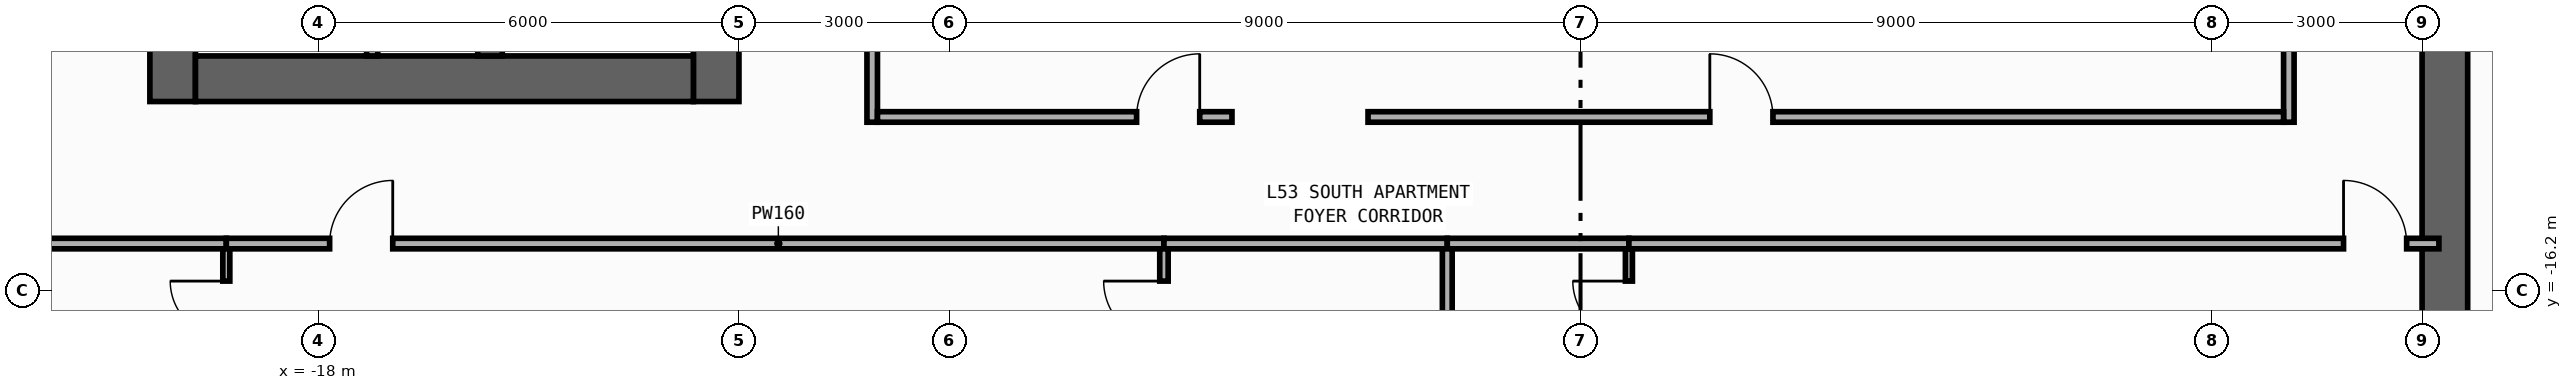
"""IFC4 building model, lengths in metres.
Left out: names, types, materials, properties, quantities, classifications, styles, units other than length and angle.
Written with IfcOpenShell. Run it as: python <this file> out.ifc"""

import sys

from ifc_helpers import new_model, si_unit, direction, frame, frame_2d, origin, place, context, subcontext, project, spatial, rectangle, extrude, element, fill, save


model = new_model("IFC4")
c1 = context("Model", 3, precision=1e-05, world=origin(), true_north=direction((0.0, 1.0)))
c2 = subcontext(c1, "Body", "Model", "MODEL_VIEW")
j1 = project(units=[si_unit("LENGTHUNIT", "METRE"), si_unit("PLANEANGLEUNIT", "RADIAN")], contexts=[c1])
p1 = place(None, origin())
s1 = spatial("IfcSite", under=j1, at=p1, CompositionType="ELEMENT")
p2 = place(p1, origin())
s2 = spatial("IfcBuilding", under=s1, at=p2, CompositionType="ELEMENT")
p3 = place(p2, frame((0.0, 0.0, 229.6)))
s3 = spatial("IfcBuildingStorey", under=s2, at=p3, CompositionType="ELEMENT", Elevation=229.6)
p4 = place(p3, frame((-20.075, -13.5, 0.0), z_axis=(0.0, 0.0, 1.0), x_axis=(0.0, 1.0, 0.0)))
e1 = element("IfcWall", 1, at=p4, inside=s3, PredefinedType="SHEAR", context=c2, shape_type="SweptSolid", body=[
    extrude(rectangle(XDim=27.0, YDim=0.65, at=frame_2d((13.5, 0.0))), origin(), (0.0, 0.0, 1.0), 3.34),
])
p5 = place(p3, frame((-12.325, -13.5, 0.0), z_axis=(0.0, 0.0, 1.0), x_axis=(0.0, 1.0, 0.0)))
e2 = element("IfcWall", 2, at=p5, inside=s3, PredefinedType="SHEAR", context=c2, shape_type="SweptSolid", body=[
    extrude(rectangle(XDim=27.0, YDim=0.65, at=frame_2d((13.5, 0.0))), origin(), (0.0, 0.0, 1.0), 3.34),
])
p6 = place(p5, frame((15.175, 0.0, 0.0)))
e3 = element("IfcOpeningElement", 3, at=p6, cuts=e2, PredefinedType="OPENING", context=c2, shape_type="SweptSolid", body=[
    extrude(rectangle(XDim=0.85, YDim=2.1, at=frame_2d((0.425, 1.05))), frame((0.0, 0.335, 0.0), z_axis=(0.0, -1.0, 0.0), x_axis=(1.0, 0.0, 0.0)), (0.0, 0.0, 1.0), 0.67),
])
p7 = place(p5, frame((21.275, 0.0, 0.0)))
e4 = element("IfcOpeningElement", 4, at=p7, cuts=e2, PredefinedType="OPENING", context=c2, shape_type="SweptSolid", body=[
    extrude(rectangle(XDim=0.85, YDim=2.1, at=frame_2d((0.425, 1.05))), frame((0.0, 0.335, 0.0), z_axis=(0.0, -1.0, 0.0), x_axis=(1.0, 0.0, 0.0)), (0.0, 0.0, 1.0), 0.67),
])
p8 = place(p5, frame((4.275, 0.0, 0.0)))
e5 = element("IfcOpeningElement", 5, at=p8, cuts=e2, PredefinedType="OPENING", context=c2, shape_type="SweptSolid", body=[
    extrude(rectangle(XDim=0.85, YDim=2.1, at=frame_2d((0.425, 1.05))), frame((0.0, 0.335, 0.0), z_axis=(0.0, -1.0, 0.0), x_axis=(1.0, 0.0, 0.0)), (0.0, 0.0, 1.0), 0.67),
])
p9 = place(p5, frame((10.275, 0.0, 0.0)))
e6 = element("IfcOpeningElement", 6, at=p9, cuts=e2, PredefinedType="OPENING", context=c2, shape_type="SweptSolid", body=[
    extrude(rectangle(XDim=0.85, YDim=2.1, at=frame_2d((0.425, 1.05))), frame((0.0, 0.335, 0.0), z_axis=(0.0, -1.0, 0.0), x_axis=(1.0, 0.0, 0.0)), (0.0, 0.0, 1.0), 0.67),
])
p10 = place(p5, frame((12.725, 0.0, 0.0)))
e7 = element("IfcOpeningElement", 7, at=p10, cuts=e2, PredefinedType="OPENING", context=c2, shape_type="SweptSolid", body=[
    extrude(rectangle(XDim=1.15, YDim=2.2, at=frame_2d((0.575, 1.1))), frame((0.0, 0.335, 0.0), z_axis=(0.0, -1.0, 0.0), x_axis=(1.0, 0.0, 0.0)), (0.0, 0.0, 1.0), 0.67),
])
p11 = place(p5, frame((1.625, 0.0, 0.0)))
e8 = element("IfcOpeningElement", 8, at=p11, cuts=e2, PredefinedType="OPENING", context=c2, shape_type="SweptSolid", body=[
    extrude(rectangle(XDim=0.85, YDim=2.1, at=frame_2d((0.425, 1.05))), frame((0.0, 0.335, 0.0), z_axis=(0.0, -1.0, 0.0), x_axis=(1.0, 0.0, 0.0)), (0.0, 0.0, 1.0), 0.67),
])
p12 = place(p3, frame((-19.75, -13.175, 0.0), z_axis=(0.0, 0.0, 1.0), x_axis=(1.0, 0.0, 0.0)))
e9 = element("IfcWall", 9, at=p12, inside=s3, PredefinedType="SHEAR", context=c2, shape_type="SweptSolid", body=[
    extrude(rectangle(XDim=7.1, YDim=0.65, at=frame_2d((3.55, 0.0))), origin(), (0.0, 0.0, 1.0), 3.34),
])
p13 = place(p3, frame((-15.55, -12.85, 0.0), z_axis=(0.0, 0.0, 1.0), x_axis=(0.0, 1.0, 0.0)))
e10 = element("IfcWall", 10, at=p13, inside=s3, PredefinedType="SHEAR", context=c2, shape_type="SweptSolid", body=[
    extrude(rectangle(XDim=25.7, YDim=0.35, at=frame_2d((12.85, 0.0))), origin(), (0.0, 0.0, 1.0), 3.34),
])
p14 = place(p13, frame((12.075, 0.0, 0.0)))
e11 = element("IfcOpeningElement", 11, at=p14, cuts=e10, PredefinedType="OPENING", context=c2, shape_type="SweptSolid", body=[
    extrude(rectangle(XDim=1.15, YDim=2.2, at=frame_2d((0.575, 1.1))), frame((0.0, 0.185, 0.0), z_axis=(0.0, -1.0, 0.0), x_axis=(1.0, 0.0, 0.0)), (0.0, 0.0, 1.0), 0.37),
])
p15 = place(p13, frame((0.975, 0.0, 0.0)))
e12 = element("IfcOpeningElement", 12, at=p15, cuts=e10, PredefinedType="OPENING", context=c2, shape_type="SweptSolid", body=[
    extrude(rectangle(XDim=0.85, YDim=2.1, at=frame_2d((0.425, 1.05))), frame((0.0, 0.185, 0.0), z_axis=(0.0, -1.0, 0.0), x_axis=(1.0, 0.0, 0.0)), (0.0, 0.0, 1.0), 0.37),
])
p16 = place(p3, frame((12.325, -19.8, 0.0), z_axis=(0.0, 0.0, 1.0), x_axis=(0.0, 1.0, 0.0)))
e13 = element("IfcWall", 13, at=p16, inside=s3, PredefinedType="SHEAR", context=c2, shape_type="SweptSolid", body=[
    extrude(rectangle(XDim=27.0, YDim=0.65, at=frame_2d((13.5, 0.0))), origin(), (0.0, 0.0, 1.0), 3.34),
])
p17 = place(p16, frame((23.05, 0.0, 0.0)))
e14 = element("IfcOpeningElement", 14, at=p17, cuts=e13, PredefinedType="OPENING", context=c2, shape_type="SweptSolid", body=[
    extrude(rectangle(XDim=1.1, YDim=2.2, at=frame_2d((0.55, 1.1))), frame((0.0, 0.335, 0.0), z_axis=(0.0, -1.0, 0.0), x_axis=(1.0, 0.0, 0.0)), (0.0, 0.0, 1.0), 0.67),
])
p18 = place(p16, frame((19.85, 0.0, 0.0)))
e15 = element("IfcOpeningElement", 15, at=p18, cuts=e13, PredefinedType="OPENING", context=c2, shape_type="SweptSolid", body=[
    extrude(rectangle(XDim=1.1, YDim=2.2, at=frame_2d((0.55, 1.1))), frame((0.0, 0.335, 0.0), z_axis=(0.0, -1.0, 0.0), x_axis=(1.0, 0.0, 0.0)), (0.0, 0.0, 1.0), 0.67),
])
p19 = place(p16, frame((16.65, 0.0, 0.0)))
e16 = element("IfcOpeningElement", 16, at=p19, cuts=e13, PredefinedType="OPENING", context=c2, shape_type="SweptSolid", body=[
    extrude(rectangle(XDim=1.1, YDim=2.2, at=frame_2d((0.55, 1.1))), frame((0.0, 0.335, 0.0), z_axis=(0.0, -1.0, 0.0), x_axis=(1.0, 0.0, 0.0)), (0.0, 0.0, 1.0), 0.67),
])
p20 = place(p16, frame((10.175, 0.0, 0.0)))
e17 = element("IfcOpeningElement", 17, at=p20, cuts=e13, PredefinedType="OPENING", context=c2, shape_type="SweptSolid", body=[
    extrude(rectangle(XDim=0.85, YDim=2.1, at=frame_2d((0.425, 1.05))), frame((0.0, 0.335, 0.0), z_axis=(0.0, -1.0, 0.0), x_axis=(1.0, 0.0, 0.0)), (0.0, 0.0, 1.0), 0.67),
])
p21 = place(p16, frame((12.725, 0.0, 0.0)))
e18 = element("IfcOpeningElement", 18, at=p21, cuts=e13, PredefinedType="OPENING", context=c2, shape_type="SweptSolid", body=[
    extrude(rectangle(XDim=1.15, YDim=2.2, at=frame_2d((0.575, 1.1))), frame((0.0, 0.335, 0.0), z_axis=(0.0, -1.0, 0.0), x_axis=(1.0, 0.0, 0.0)), (0.0, 0.0, 1.0), 0.67),
])
p22 = place(p16, frame((25.125, 0.0, 0.0)))
e19 = element("IfcOpeningElement", 19, at=p22, cuts=e13, PredefinedType="OPENING", context=c2, shape_type="SweptSolid", body=[
    extrude(rectangle(XDim=0.85, YDim=2.1, at=frame_2d((0.425, 1.05))), frame((0.0, 0.335, 0.0), z_axis=(0.0, -1.0, 0.0), x_axis=(1.0, 0.0, 0.0)), (0.0, 0.0, 1.0), 0.67),
])
p23 = place(p3, frame((-17.23, -12.85, 0.0), z_axis=(0.0, 0.0, 1.0), x_axis=(0.0, 1.0, 0.0)))
e20 = element("IfcWall", 20, at=p23, inside=s3, PredefinedType="PARTITIONING", context=c2, shape_type="SweptSolid", body=[
    extrude(rectangle(XDim=2.38, YDim=0.16, at=frame_2d((1.19, 0.0))), origin(), (0.0, 0.0, 1.0), 3.34),
])
p24 = place(p23, frame((0.46, 0.0, 0.0)))
e21 = element("IfcOpeningElement", 21, at=p24, cuts=e20, PredefinedType="OPENING", context=c2, shape_type="SweptSolid", body=[
    extrude(rectangle(XDim=0.85, YDim=2.1, at=frame_2d((0.425, 1.05))), frame((0.0, 0.09, 0.0), z_axis=(0.0, -1.0, 0.0), x_axis=(1.0, 0.0, 0.0)), (0.0, 0.0, 1.0), 0.18),
])
p25 = place(p3, frame((-10.1, -13.795, 0.0), z_axis=(0.0, 0.0, 1.0), x_axis=(0.0, 1.0, 0.0)))
e22 = element("IfcWall", 22, at=p25, inside=s3, PredefinedType="PARTITIONING", context=c2, shape_type="SweptSolid", body=[
    extrude(rectangle(XDim=9.005, YDim=0.15, at=frame_2d((4.502, 0.0))), origin(), (0.0, 0.0, 1.0), 3.34),
])
p26 = place(p25, frame((7.645, 0.0, 0.0)))
e23 = element("IfcOpeningElement", 23, at=p26, cuts=e22, PredefinedType="OPENING", context=c2, shape_type="SweptSolid", body=[
    extrude(rectangle(XDim=0.9, YDim=2.15, at=frame_2d((0.45, 1.075))), frame((0.0, 0.085, 0.0), z_axis=(0.0, -1.0, 0.0), x_axis=(1.0, 0.0, 0.0)), (0.0, 0.0, 1.0), 0.17),
])
p27 = place(p3, frame((10.1, -13.795, 0.0), z_axis=(0.0, 0.0, 1.0), x_axis=(0.0, 1.0, 0.0)))
e24 = element("IfcWall", 24, at=p27, inside=s3, PredefinedType="PARTITIONING", context=c2, shape_type="SweptSolid", body=[
    extrude(rectangle(XDim=6.375, YDim=0.15, at=frame_2d((3.188, 0.0))), origin(), (0.0, 0.0, 1.0), 3.34),
])
p28 = place(p27, frame((5.015, 0.0, 0.0)))
e25 = element("IfcOpeningElement", 25, at=p28, cuts=e24, PredefinedType="OPENING", context=c2, shape_type="SweptSolid", body=[
    extrude(rectangle(XDim=0.9, YDim=2.15, at=frame_2d((0.45, 1.075))), frame((0.0, 0.085, 0.0), z_axis=(0.0, -1.0, 0.0), x_axis=(1.0, 0.0, 0.0)), (0.0, 0.0, 1.0), 0.17),
])
p29 = place(p3, frame((-21.955, -15.525, 0.0), z_axis=(0.0, 0.0, 1.0), x_axis=(1.0, 0.0, 0.0)))
e26 = element("IfcWall", 26, at=p29, inside=s3, PredefinedType="PARTITIONING", context=c2, shape_type="SweptSolid", body=[
    extrude(rectangle(XDim=2.645, YDim=0.15, at=frame_2d((1.323, 0.0))), origin(), (0.0, 0.0, 1.0), 3.34),
])
p30 = place(p3, frame((-19.31, -15.525, 0.0), z_axis=(0.0, 0.0, 1.0), x_axis=(1.0, 0.0, 0.0)))
e27 = element("IfcWall", 27, at=p30, inside=s3, PredefinedType="PARTITIONING", context=c2, shape_type="SweptSolid", body=[
    extrude(rectangle(XDim=13.37, YDim=0.15, at=frame_2d((6.685, 0.0))), origin(), (0.0, 0.0, 1.0), 3.34),
])
p31 = place(p30, frame((1.473, 0.0, 0.0)))
e28 = element("IfcOpeningElement", 28, at=p31, cuts=e27, PredefinedType="OPENING", context=c2, shape_type="SweptSolid", body=[
    extrude(rectangle(XDim=0.9, YDim=2.15, at=frame_2d((0.45, 1.075))), frame((0.0, 0.085, 0.0), z_axis=(0.0, -1.0, 0.0), x_axis=(1.0, 0.0, 0.0)), (0.0, 0.0, 1.0), 0.17),
])
p32 = place(p3, frame((-5.94, -15.525, 0.0), z_axis=(0.0, 0.0, 1.0), x_axis=(1.0, 0.0, 0.0)))
e29 = element("IfcWall", 29, at=p32, inside=s3, PredefinedType="PARTITIONING", context=c2, shape_type="SweptSolid", body=[
    extrude(rectangle(XDim=4.04, YDim=0.15, at=frame_2d((2.02, 0.0))), origin(), (0.0, 0.0, 1.0), 3.34),
])
p33 = place(p3, frame((-1.9, -15.525, 0.0), z_axis=(0.0, 0.0, 1.0), x_axis=(1.0, 0.0, 0.0)))
e30 = element("IfcWall", 30, at=p33, inside=s3, PredefinedType="PARTITIONING", context=c2, shape_type="SweptSolid", body=[
    extrude(rectangle(XDim=2.59, YDim=0.15, at=frame_2d((1.295, 0.0))), origin(), (0.0, 0.0, 1.0), 3.34),
])
p34 = place(p3, frame((0.69, -15.525, 0.0), z_axis=(0.0, 0.0, 1.0), x_axis=(1.0, 0.0, 0.0)))
e31 = element("IfcWall", 31, at=p34, inside=s3, PredefinedType="PARTITIONING", context=c2, shape_type="SweptSolid", body=[
    extrude(rectangle(XDim=11.55, YDim=0.15, at=frame_2d((5.775, 0.0))), origin(), (0.0, 0.0, 1.0), 3.34),
])
p35 = place(p34, frame((10.19, 0.0, 0.0)))
e32 = element("IfcOpeningElement", 32, at=p35, cuts=e31, PredefinedType="OPENING", context=c2, shape_type="SweptSolid", body=[
    extrude(rectangle(XDim=0.9, YDim=2.15, at=frame_2d((0.45, 1.075))), frame((0.0, 0.085, 0.0), z_axis=(0.0, -1.0, 0.0), x_axis=(1.0, 0.0, 0.0)), (0.0, 0.0, 1.0), 0.17),
])
p36 = place(p3, frame((-10.025, -13.72, 0.0), z_axis=(0.0, 0.0, 1.0), x_axis=(1.0, 0.0, 0.0)))
e33 = element("IfcWall", 33, at=p36, inside=s3, PredefinedType="PARTITIONING", context=c2, shape_type="SweptSolid", body=[
    extrude(rectangle(XDim=5.055, YDim=0.15, at=frame_2d((2.527, 0.0))), origin(), (0.0, 0.0, 1.0), 3.34),
])
p37 = place(p36, frame((3.695, 0.0, 0.0)))
e34 = element("IfcOpeningElement", 34, at=p37, cuts=e33, PredefinedType="OPENING", context=c2, shape_type="SweptSolid", body=[
    extrude(rectangle(XDim=0.9, YDim=2.15, at=frame_2d((0.45, 1.075))), frame((0.0, 0.085, 0.0), z_axis=(0.0, -1.0, 0.0), x_axis=(1.0, 0.0, 0.0)), (0.0, 0.0, 1.0), 0.17),
])
p38 = place(p3, frame((-3.03, -13.72, 0.0), z_axis=(0.0, 0.0, 1.0), x_axis=(1.0, 0.0, 0.0)))
e35 = element("IfcWall", 35, at=p38, inside=s3, PredefinedType="PARTITIONING", context=c2, shape_type="SweptSolid", body=[
    extrude(rectangle(XDim=13.055, YDim=0.15, at=frame_2d((6.527, 0.0))), origin(), (0.0, 0.0, 1.0), 3.34),
])
p39 = place(p38, frame((4.874, 0.0, 0.0)))
e36 = element("IfcOpeningElement", 36, at=p39, cuts=e35, PredefinedType="OPENING", context=c2, shape_type="SweptSolid", body=[
    extrude(rectangle(XDim=0.9, YDim=2.15, at=frame_2d((0.45, 1.075))), frame((0.0, 0.085, 0.0), z_axis=(0.0, -1.0, 0.0), x_axis=(1.0, 0.0, 0.0)), (0.0, 0.0, 1.0), 0.17),
])
p40 = place(p3, frame((-19.31, -18.1, 0.0), z_axis=(0.0, 0.0, 1.0), x_axis=(0.0, 1.0, 0.0)))
e37 = element("IfcWall", 37, at=p40, inside=s3, PredefinedType="PARTITIONING", context=c2, shape_type="SweptSolid", body=[
    extrude(rectangle(XDim=2.5, YDim=0.1, at=frame_2d((1.25, 0.0))), origin(), (0.0, 0.0, 1.0), 3.34),
])
p41 = place(p40, frame((1.24, 0.0, 0.0)))
e38 = element("IfcOpeningElement", 38, at=p41, cuts=e37, PredefinedType="OPENING", context=c2, shape_type="SweptSolid", body=[
    extrude(rectangle(XDim=0.8, YDim=2.1, at=frame_2d((0.4, 1.05))), frame((0.0, 0.06, 0.0), z_axis=(0.0, -1.0, 0.0), x_axis=(1.0, 0.0, 0.0)), (0.0, 0.0, 1.0), 0.12),
])
p42 = place(p3, frame((-5.94, -20.1, 0.0), z_axis=(0.0, 0.0, 1.0), x_axis=(0.0, 1.0, 0.0)))
e39 = element("IfcWall", 39, at=p42, inside=s3, PredefinedType="PARTITIONING", context=c2, shape_type="SweptSolid", body=[
    extrude(rectangle(XDim=4.5, YDim=0.12, at=frame_2d((2.25, 0.0))), origin(), (0.0, 0.0, 1.0), 3.34),
])
p43 = place(p42, frame((3.18, 0.0, 0.0)))
e40 = element("IfcOpeningElement", 40, at=p43, cuts=e39, PredefinedType="OPENING", context=c2, shape_type="SweptSolid", body=[
    extrude(rectangle(XDim=0.86, YDim=2.15, at=frame_2d((0.43, 1.075))), frame((0.0, 0.07, 0.0), z_axis=(0.0, -1.0, 0.0), x_axis=(1.0, 0.0, 0.0)), (0.0, 0.0, 1.0), 0.14),
])
p44 = place(p3, frame((-1.9, -18.1, 0.0), z_axis=(0.0, 0.0, 1.0), x_axis=(0.0, 1.0, 0.0)))
e41 = element("IfcWall", 41, at=p44, inside=s3, PredefinedType="PARTITIONING", context=c2, shape_type="SweptSolid", body=[
    extrude(rectangle(XDim=2.5, YDim=0.14, at=frame_2d((1.25, 0.0))), origin(), (0.0, 0.0, 1.0), 3.34),
])
p45 = place(p3, frame((0.69, -18.1, 0.0), z_axis=(0.0, 0.0, 1.0), x_axis=(0.0, 1.0, 0.0)))
e42 = element("IfcWall", 42, at=p45, inside=s3, PredefinedType="PARTITIONING", context=c2, shape_type="SweptSolid", body=[
    extrude(rectangle(XDim=2.5, YDim=0.1, at=frame_2d((1.25, 0.0))), origin(), (0.0, 0.0, 1.0), 3.34),
])
p46 = place(p45, frame((1.24, 0.0, 0.0)))
e43 = element("IfcOpeningElement", 43, at=p46, cuts=e42, PredefinedType="OPENING", context=c2, shape_type="SweptSolid", body=[
    extrude(rectangle(XDim=0.8, YDim=2.1, at=frame_2d((0.4, 1.05))), frame((0.0, 0.06, 0.0), z_axis=(0.0, -1.0, 0.0), x_axis=(1.0, 0.0, 0.0)), (0.0, 0.0, 1.0), 0.12),
])
p47 = place(p31, origin())
e44 = element("IfcDoor", 44, at=p47, inside=s3, OperationType="SINGLE_SWING_RIGHT", PredefinedType="DOOR", context=c2, shape_type="SweptSolid", body=[
    extrude(rectangle(XDim=0.9, YDim=2.15, at=frame_2d((0.45, 1.075))), frame((0.0, 0.025, 0.0), z_axis=(0.0, -1.0, 0.0), x_axis=(1.0, 0.0, 0.0)), (0.0, 0.0, 1.0), 0.05),
])
fill(e28, e44)
p48 = place(p35, origin())
e45 = element("IfcDoor", 45, at=p48, inside=s3, OperationType="SINGLE_SWING_LEFT", PredefinedType="DOOR", context=c2, shape_type="SweptSolid", body=[
    extrude(rectangle(XDim=0.9, YDim=2.15, at=frame_2d((0.45, 1.075))), frame((0.0, 0.025, 0.0), z_axis=(0.0, -1.0, 0.0), x_axis=(1.0, 0.0, 0.0)), (0.0, 0.0, 1.0), 0.05),
])
fill(e32, e45)
p49 = place(p37, origin())
e46 = element("IfcDoor", 46, at=p49, inside=s3, OperationType="SINGLE_SWING_RIGHT", PredefinedType="DOOR", context=c2, shape_type="SweptSolid", body=[
    extrude(rectangle(XDim=0.9, YDim=2.15, at=frame_2d((0.45, 1.075))), frame((0.0, 0.025, 0.0), z_axis=(0.0, -1.0, 0.0), x_axis=(1.0, 0.0, 0.0)), (0.0, 0.0, 1.0), 0.05),
])
fill(e34, e46)
p50 = place(p39, origin())
e47 = element("IfcDoor", 47, at=p50, inside=s3, OperationType="SINGLE_SWING_LEFT", PredefinedType="DOOR", context=c2, shape_type="SweptSolid", body=[
    extrude(rectangle(XDim=0.9, YDim=2.15, at=frame_2d((0.45, 1.075))), frame((0.0, 0.025, 0.0), z_axis=(0.0, -1.0, 0.0), x_axis=(1.0, 0.0, 0.0)), (0.0, 0.0, 1.0), 0.05),
])
fill(e36, e47)
p51 = place(p41, origin())
e48 = element("IfcDoor", 48, at=p51, inside=s3, OperationType="SINGLE_SWING_RIGHT", PredefinedType="DOOR", context=c2, shape_type="SweptSolid", body=[
    extrude(rectangle(XDim=0.8, YDim=2.1, at=frame_2d((0.4, 1.05))), frame((0.0, 0.025, 0.0), z_axis=(0.0, -1.0, 0.0), x_axis=(1.0, 0.0, 0.0)), (0.0, 0.0, 1.0), 0.05),
])
fill(e38, e48)
p52 = place(p43, origin())
e49 = element("IfcDoor", 49, at=p52, inside=s3, OperationType="SINGLE_SWING_RIGHT", PredefinedType="DOOR", context=c2, shape_type="SweptSolid", body=[
    extrude(rectangle(XDim=0.86, YDim=2.15, at=frame_2d((0.43, 1.075))), frame((0.0, 0.025, 0.0), z_axis=(0.0, -1.0, 0.0), x_axis=(1.0, 0.0, 0.0)), (0.0, 0.0, 1.0), 0.05),
])
fill(e40, e49)
p53 = place(p46, origin())
e50 = element("IfcDoor", 50, at=p53, inside=s3, OperationType="SINGLE_SWING_RIGHT", PredefinedType="DOOR", context=c2, shape_type="SweptSolid", body=[
    extrude(rectangle(XDim=0.8, YDim=2.1, at=frame_2d((0.4, 1.05))), frame((0.0, 0.025, 0.0), z_axis=(0.0, -1.0, 0.0), x_axis=(1.0, 0.0, 0.0)), (0.0, 0.0, 1.0), 0.05),
])
fill(e43, e50)
save(model, sys.argv[1])
